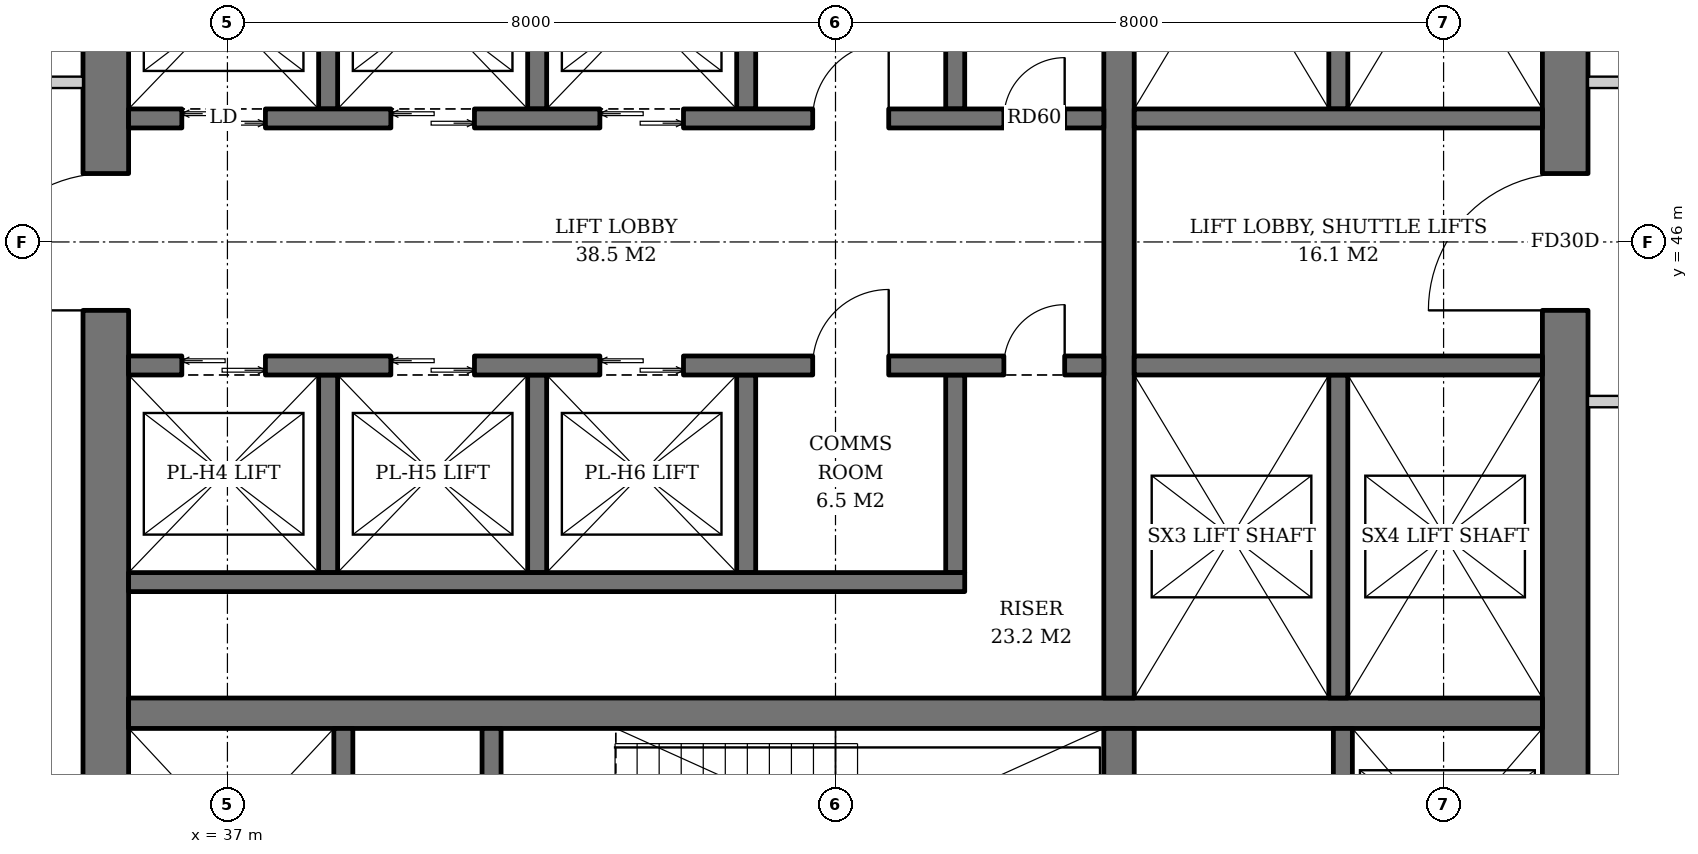
"""IFC4 building model, lengths in metres.
Left out: names, types, materials, properties, quantities, classifications, styles, units other than length and angle.
Written with IfcOpenShell. Run it as: python <this file> out.ifc"""

import sys

from ifc_helpers import new_model, si_unit, direction, frame, frame_2d, origin, place, context, subcontext, project, spatial, rectangle, extrude, element, fill, save


model = new_model("IFC4")
c1 = context("Model", 3, precision=1e-05, world=origin(), true_north=direction((0.0, 1.0)))
c2 = subcontext(c1, "Body", "Model", "MODEL_VIEW")
j1 = project(units=[si_unit("LENGTHUNIT", "METRE"), si_unit("PLANEANGLEUNIT", "RADIAN")], contexts=[c1])
p1 = place(None, origin())
s1 = spatial("IfcSite", under=j1, at=p1, CompositionType="ELEMENT")
p2 = place(p1, origin())
s2 = spatial("IfcBuilding", under=s1, at=p2, CompositionType="ELEMENT")
p3 = place(p2, frame((0.0, 0.0, 195.8)))
s3 = spatial("IfcBuildingStorey", under=s2, at=p3, CompositionType="ELEMENT", Elevation=195.8)
p4 = place(p3, frame((35.4, 36.7, 0.0), z_axis=(0.0, 0.0, 1.0), x_axis=(0.0, 1.0, 0.0)))
e1 = element("IfcWall", 1, at=p4, inside=s3, PredefinedType="SHEAR", context=c2, shape_type="SweptSolid", body=[
    extrude(rectangle(XDim=18.6, YDim=0.6, at=frame_2d((9.3, 0.0))), origin(), (0.0, 0.0, 1.0), 3.8),
])
p5 = place(p4, frame((8.4, 0.0, 0.0)))
e2 = element("IfcOpeningElement", 2, at=p5, cuts=e1, PredefinedType="OPENING", context=c2, shape_type="SweptSolid", body=[
    extrude(rectangle(XDim=1.8, YDim=2.4, at=frame_2d((0.9, 1.2))), frame((0.0, 0.31, 0.0), z_axis=(0.0, -1.0, 0.0), x_axis=(1.0, 0.0, 0.0)), (0.0, 0.0, 1.0), 0.62),
])
p6 = place(p3, frame((54.6, 36.7, 0.0), z_axis=(0.0, 0.0, 1.0), x_axis=(0.0, 1.0, 0.0)))
e3 = element("IfcWall", 3, at=p6, inside=s3, PredefinedType="SHEAR", context=c2, shape_type="SweptSolid", body=[
    extrude(rectangle(XDim=18.6, YDim=0.6, at=frame_2d((9.3, 0.0))), origin(), (0.0, 0.0, 1.0), 3.8),
])
p7 = place(p6, frame((8.4, 0.0, 0.0)))
e4 = element("IfcOpeningElement", 4, at=p7, cuts=e3, PredefinedType="OPENING", context=c2, shape_type="SweptSolid", body=[
    extrude(rectangle(XDim=1.8, YDim=2.4, at=frame_2d((0.9, 1.2))), frame((0.0, 0.31, 0.0), z_axis=(0.0, -1.0, 0.0), x_axis=(1.0, 0.0, 0.0)), (0.0, 0.0, 1.0), 0.62),
])
p8 = place(p3, frame((35.7, 39.8, 0.0), z_axis=(0.0, 0.0, 1.0), x_axis=(1.0, 0.0, 0.0)))
e5 = element("IfcWall", 5, at=p8, inside=s3, PredefinedType="SHEAR", context=c2, shape_type="SweptSolid", body=[
    extrude(rectangle(XDim=18.6, YDim=0.4, at=frame_2d((9.3, 0.0))), origin(), (0.0, 0.0, 1.0), 3.8),
])
p9 = place(p3, frame((48.73, 36.7, 0.0), z_axis=(0.0, 0.0, 1.0), x_axis=(0.0, 1.0, 0.0)))
e6 = element("IfcWall", 6, at=p9, inside=s3, PredefinedType="SHEAR", context=c2, shape_type="SweptSolid", body=[
    extrude(rectangle(XDim=2.9, YDim=0.4, at=frame_2d((1.45, 0.0))), origin(), (0.0, 0.0, 1.0), 3.8),
])
p10 = place(p3, frame((48.73, 40.0, 0.0), z_axis=(0.0, 0.0, 1.0), x_axis=(0.0, 1.0, 0.0)))
e7 = element("IfcWall", 7, at=p10, inside=s3, PredefinedType="SHEAR", context=c2, shape_type="SweptSolid", body=[
    extrude(rectangle(XDim=12.0, YDim=0.4, at=frame_2d((6.0, 0.0))), origin(), (0.0, 0.0, 1.0), 3.8),
])
p11 = place(p3, frame((38.525, 36.7, 0.0), z_axis=(0.0, 0.0, 1.0), x_axis=(0.0, 1.0, 0.0)))
e8 = element("IfcWall", 8, at=p11, inside=s3, PredefinedType="SHEAR", context=c2, shape_type="SweptSolid", body=[
    extrude(rectangle(XDim=2.9, YDim=0.25, at=frame_2d((1.45, 0.0))), origin(), (0.0, 0.0, 1.0), 3.8),
])
p12 = place(p11, frame((0.8, 0.0, 0.0)))
e9 = element("IfcOpeningElement", 9, at=p12, cuts=e8, PredefinedType="OPENING", context=c2, shape_type="SweptSolid", body=[
    extrude(rectangle(XDim=1.3, YDim=2.2, at=frame_2d((0.65, 1.1))), frame((0.0, 0.135, 0.0), z_axis=(0.0, -1.0, 0.0), x_axis=(1.0, 0.0, 0.0)), (0.0, 0.0, 1.0), 0.27),
])
p13 = place(p3, frame((40.475, 36.7, 0.0), z_axis=(0.0, 0.0, 1.0), x_axis=(0.0, 1.0, 0.0)))
e10 = element("IfcWall", 10, at=p13, inside=s3, PredefinedType="SHEAR", context=c2, shape_type="SweptSolid", body=[
    extrude(rectangle(XDim=2.9, YDim=0.25, at=frame_2d((1.45, 0.0))), origin(), (0.0, 0.0, 1.0), 3.8),
])
p14 = place(p13, frame((0.75, 0.0, 0.0)))
e11 = element("IfcOpeningElement", 11, at=p14, cuts=e10, PredefinedType="OPENING", context=c2, shape_type="SweptSolid", body=[
    extrude(rectangle(XDim=1.2, YDim=2.1, at=frame_2d((0.6, 1.05))), frame((0.0, 0.135, 0.0), z_axis=(0.0, -1.0, 0.0), x_axis=(1.0, 0.0, 0.0)), (0.0, 0.0, 1.0), 0.27),
])
p15 = place(p3, frame((51.675, 36.7, 0.0), z_axis=(0.0, 0.0, 1.0), x_axis=(0.0, 1.0, 0.0)))
e12 = element("IfcWall", 12, at=p15, inside=s3, PredefinedType="SHEAR", context=c2, shape_type="SweptSolid", body=[
    extrude(rectangle(XDim=2.9, YDim=0.25, at=frame_2d((1.45, 0.0))), origin(), (0.0, 0.0, 1.0), 3.8),
])
p16 = place(p15, frame((0.75, 0.0, 0.0)))
e13 = element("IfcOpeningElement", 13, at=p16, cuts=e12, PredefinedType="OPENING", context=c2, shape_type="SweptSolid", body=[
    extrude(rectangle(XDim=1.4, YDim=2.4, at=frame_2d((0.7, 1.2))), frame((0.0, 0.135, 0.0), z_axis=(0.0, -1.0, 0.0), x_axis=(1.0, 0.0, 0.0)), (0.0, 0.0, 1.0), 0.27),
])
for number, where, z_axis, x_axis in (
    (14, (38.325, 47.75, 0.0), (0.0, 0.0, 1.0), (0.0, 1.0, 0.0)),
    (15, (41.075, 47.75, 0.0), (0.0, 0.0, 1.0), (0.0, 1.0, 0.0)),
    (16, (43.825, 47.75, 0.0), (0.0, 0.0, 1.0), (0.0, 1.0, 0.0)),
    (17, (46.575, 47.75, 0.0), (0.0, 0.0, 1.0), (0.0, 1.0, 0.0)),
):
    element("IfcWall", number, at=place(p3, frame(where, z_axis=z_axis, x_axis=x_axis)), inside=s3, PredefinedType="SHEAR", context=c2, shape_type="SweptSolid", body=[
        extrude(rectangle(XDim=2.6, YDim=0.25, at=frame_2d((1.3, 0.0))), origin(), (0.0, 0.0, 1.0), 3.8),
    ])
p17 = place(p3, frame((35.7, 47.625, 0.0), z_axis=(0.0, 0.0, 1.0), x_axis=(1.0, 0.0, 0.0)))
e18 = element("IfcWall", 18, at=p17, inside=s3, PredefinedType="SHEAR", context=c2, shape_type="SweptSolid", body=[
    extrude(rectangle(XDim=12.83, YDim=0.25, at=frame_2d((6.415, 0.0))), origin(), (0.0, 0.0, 1.0), 3.8),
])
p18 = place(p17, frame((0.7, 0.0, 0.0)))
e19 = element("IfcOpeningElement", 19, at=p18, cuts=e18, PredefinedType="OPENING", context=c2, shape_type="SweptSolid", body=[
    extrude(rectangle(XDim=1.1, YDim=2.2, at=frame_2d((0.55, 1.1))), frame((0.0, 0.135, 0.0), z_axis=(0.0, -1.0, 0.0), x_axis=(1.0, 0.0, 0.0)), (0.0, 0.0, 1.0), 0.27),
])
p19 = place(p17, frame((3.45, 0.0, 0.0)))
e20 = element("IfcOpeningElement", 20, at=p19, cuts=e18, PredefinedType="OPENING", context=c2, shape_type="SweptSolid", body=[
    extrude(rectangle(XDim=1.1, YDim=2.2, at=frame_2d((0.55, 1.1))), frame((0.0, 0.135, 0.0), z_axis=(0.0, -1.0, 0.0), x_axis=(1.0, 0.0, 0.0)), (0.0, 0.0, 1.0), 0.27),
])
p20 = place(p17, frame((6.2, 0.0, 0.0)))
e21 = element("IfcOpeningElement", 21, at=p20, cuts=e18, PredefinedType="OPENING", context=c2, shape_type="SweptSolid", body=[
    extrude(rectangle(XDim=1.1, YDim=2.2, at=frame_2d((0.55, 1.1))), frame((0.0, 0.135, 0.0), z_axis=(0.0, -1.0, 0.0), x_axis=(1.0, 0.0, 0.0)), (0.0, 0.0, 1.0), 0.27),
])
p21 = place(p17, frame((9.0, 0.0, 0.0)))
e22 = element("IfcOpeningElement", 22, at=p21, cuts=e18, PredefinedType="OPENING", context=c2, shape_type="SweptSolid", body=[
    extrude(rectangle(XDim=1.0, YDim=2.1, at=frame_2d((0.5, 1.05))), frame((0.0, 0.135, 0.0), z_axis=(0.0, -1.0, 0.0), x_axis=(1.0, 0.0, 0.0)), (0.0, 0.0, 1.0), 0.27),
])
p22 = place(p17, frame((11.515, 0.0, 0.0)))
e23 = element("IfcOpeningElement", 23, at=p22, cuts=e18, PredefinedType="OPENING", context=c2, shape_type="SweptSolid", body=[
    extrude(rectangle(XDim=0.8, YDim=2.0, at=frame_2d((0.4, 1.0))), frame((0.0, 0.135, 0.0), z_axis=(0.0, -1.0, 0.0), x_axis=(1.0, 0.0, 0.0)), (0.0, 0.0, 1.0), 0.27),
])
for number, where, z_axis, x_axis in (
    (24, (38.325, 44.25, 0.0), (0.0, 0.0, 1.0), (0.0, -1.0, 0.0)),
    (25, (41.075, 44.25, 0.0), (0.0, 0.0, 1.0), (0.0, -1.0, 0.0)),
    (26, (43.825, 44.25, 0.0), (0.0, 0.0, 1.0), (0.0, -1.0, 0.0)),
    (27, (46.575, 44.25, 0.0), (0.0, 0.0, 1.0), (0.0, -1.0, 0.0)),
):
    element("IfcWall", number, at=place(p3, frame(where, z_axis=z_axis, x_axis=x_axis)), inside=s3, PredefinedType="SHEAR", context=c2, shape_type="SweptSolid", body=[
        extrude(rectangle(XDim=2.6, YDim=0.25, at=frame_2d((1.3, 0.0))), origin(), (0.0, 0.0, 1.0), 3.8),
    ])
p23 = place(p3, frame((35.7, 41.525, 0.0), z_axis=(0.0, 0.0, 1.0), x_axis=(1.0, 0.0, 0.0)))
e28 = element("IfcWall", 28, at=p23, inside=s3, PredefinedType="SHEAR", context=c2, shape_type="SweptSolid", body=[
    extrude(rectangle(XDim=11.0, YDim=0.25, at=frame_2d((5.5, 0.0))), origin(), (0.0, 0.0, 1.0), 3.8),
])
p24 = place(p3, frame((35.7, 44.375, 0.0), z_axis=(0.0, 0.0, 1.0), x_axis=(1.0, 0.0, 0.0)))
e29 = element("IfcWall", 29, at=p24, inside=s3, PredefinedType="SHEAR", context=c2, shape_type="SweptSolid", body=[
    extrude(rectangle(XDim=12.83, YDim=0.25, at=frame_2d((6.415, 0.0))), origin(), (0.0, 0.0, 1.0), 3.8),
])
p25 = place(p24, frame((0.7, 0.0, 0.0)))
e30 = element("IfcOpeningElement", 30, at=p25, cuts=e29, PredefinedType="OPENING", context=c2, shape_type="SweptSolid", body=[
    extrude(rectangle(XDim=1.1, YDim=2.2, at=frame_2d((0.55, 1.1))), frame((0.0, 0.135, 0.0), z_axis=(0.0, -1.0, 0.0), x_axis=(1.0, 0.0, 0.0)), (0.0, 0.0, 1.0), 0.27),
])
p26 = place(p24, frame((3.45, 0.0, 0.0)))
e31 = element("IfcOpeningElement", 31, at=p26, cuts=e29, PredefinedType="OPENING", context=c2, shape_type="SweptSolid", body=[
    extrude(rectangle(XDim=1.1, YDim=2.2, at=frame_2d((0.55, 1.1))), frame((0.0, 0.135, 0.0), z_axis=(0.0, -1.0, 0.0), x_axis=(1.0, 0.0, 0.0)), (0.0, 0.0, 1.0), 0.27),
])
p27 = place(p24, frame((6.2, 0.0, 0.0)))
e32 = element("IfcOpeningElement", 32, at=p27, cuts=e29, PredefinedType="OPENING", context=c2, shape_type="SweptSolid", body=[
    extrude(rectangle(XDim=1.1, YDim=2.2, at=frame_2d((0.55, 1.1))), frame((0.0, 0.135, 0.0), z_axis=(0.0, -1.0, 0.0), x_axis=(1.0, 0.0, 0.0)), (0.0, 0.0, 1.0), 0.27),
])
p28 = place(p24, frame((9.0, 0.0, 0.0)))
e33 = element("IfcOpeningElement", 33, at=p28, cuts=e29, PredefinedType="OPENING", context=c2, shape_type="SweptSolid", body=[
    extrude(rectangle(XDim=1.0, YDim=2.1, at=frame_2d((0.5, 1.05))), frame((0.0, 0.135, 0.0), z_axis=(0.0, -1.0, 0.0), x_axis=(1.0, 0.0, 0.0)), (0.0, 0.0, 1.0), 0.27),
])
p29 = place(p24, frame((11.515, 0.0, 0.0)))
e34 = element("IfcOpeningElement", 34, at=p29, cuts=e29, PredefinedType="OPENING", context=c2, shape_type="SweptSolid", body=[
    extrude(rectangle(XDim=0.8, YDim=2.0, at=frame_2d((0.4, 1.0))), frame((0.0, 0.135, 0.0), z_axis=(0.0, -1.0, 0.0), x_axis=(1.0, 0.0, 0.0)), (0.0, 0.0, 1.0), 0.27),
])
p30 = place(p3, frame((51.615, 47.75, 0.0), z_axis=(0.0, 0.0, 1.0), x_axis=(0.0, 1.0, 0.0)))
e35 = element("IfcWall", 35, at=p30, inside=s3, PredefinedType="SHEAR", context=c2, shape_type="SweptSolid", body=[
    extrude(rectangle(XDim=4.25, YDim=0.25, at=frame_2d((2.125, 0.0))), origin(), (0.0, 0.0, 1.0), 3.8),
])
p31 = place(p3, frame((48.93, 47.625, 0.0), z_axis=(0.0, 0.0, 1.0), x_axis=(1.0, 0.0, 0.0)))
e36 = element("IfcWall", 36, at=p31, inside=s3, PredefinedType="SHEAR", context=c2, shape_type="SweptSolid", body=[
    extrude(rectangle(XDim=5.37, YDim=0.25, at=frame_2d((2.685, 0.0))), origin(), (0.0, 0.0, 1.0), 3.8),
])
p32 = place(p3, frame((51.615, 44.25, 0.0), z_axis=(0.0, 0.0, 1.0), x_axis=(0.0, -1.0, 0.0)))
e37 = element("IfcWall", 37, at=p32, inside=s3, PredefinedType="SHEAR", context=c2, shape_type="SweptSolid", body=[
    extrude(rectangle(XDim=4.25, YDim=0.25, at=frame_2d((2.125, 0.0))), origin(), (0.0, 0.0, 1.0), 3.8),
])
p33 = place(p3, frame((48.93, 44.375, 0.0), z_axis=(0.0, 0.0, 1.0), x_axis=(1.0, 0.0, 0.0)))
e38 = element("IfcWall", 38, at=p33, inside=s3, PredefinedType="SHEAR", context=c2, shape_type="SweptSolid", body=[
    extrude(rectangle(XDim=5.37, YDim=0.25, at=frame_2d((2.685, 0.0))), origin(), (0.0, 0.0, 1.0), 3.8),
])
for number, where, z_axis, x_axis in (
    (39, (54.9, 43.9, 0.0), (0.0, 0.0, 1.0), (1.0, 0.0, 0.0)),
    (40, (54.9, 48.1, 0.0), (0.0, 0.0, 1.0), (1.0, 0.0, 0.0)),
    (41, (35.1, 48.1, 0.0), (0.0, 0.0, 1.0), (-1.0, 0.0, 0.0)),
):
    element("IfcWall", number, at=place(p3, frame(where, z_axis=z_axis, x_axis=x_axis)), inside=s3, PredefinedType="PARTITIONING", context=c2, shape_type="SweptSolid", body=[
        extrude(rectangle(XDim=2.325, YDim=0.15, at=frame_2d((1.163, 0.0))), origin(), (0.0, 0.0, 1.0), 3.62),
    ])
p34 = place(p18, origin())
e42 = element("IfcDoor", 42, at=p34, inside=s3, OperationType="DOUBLE_DOOR_SLIDING", PredefinedType="DOOR", context=c2, shape_type="SweptSolid", body=[
    extrude(rectangle(XDim=1.1, YDim=2.2, at=frame_2d((0.55, 1.1))), frame((0.0, 0.025, 0.0), z_axis=(0.0, -1.0, 0.0), x_axis=(1.0, 0.0, 0.0)), (0.0, 0.0, 1.0), 0.05),
])
fill(e19, e42)
p35 = place(p19, origin())
e43 = element("IfcDoor", 43, at=p35, inside=s3, OperationType="DOUBLE_DOOR_SLIDING", PredefinedType="DOOR", context=c2, shape_type="SweptSolid", body=[
    extrude(rectangle(XDim=1.1, YDim=2.2, at=frame_2d((0.55, 1.1))), frame((0.0, 0.025, 0.0), z_axis=(0.0, -1.0, 0.0), x_axis=(1.0, 0.0, 0.0)), (0.0, 0.0, 1.0), 0.05),
])
fill(e20, e43)
p36 = place(p20, origin())
e44 = element("IfcDoor", 44, at=p36, inside=s3, OperationType="DOUBLE_DOOR_SLIDING", PredefinedType="DOOR", context=c2, shape_type="SweptSolid", body=[
    extrude(rectangle(XDim=1.1, YDim=2.2, at=frame_2d((0.55, 1.1))), frame((0.0, 0.025, 0.0), z_axis=(0.0, -1.0, 0.0), x_axis=(1.0, 0.0, 0.0)), (0.0, 0.0, 1.0), 0.05),
])
fill(e21, e44)
p37 = place(p21, origin())
e45 = element("IfcDoor", 45, at=p37, inside=s3, OperationType="SINGLE_SWING_RIGHT", PredefinedType="DOOR", context=c2, shape_type="SweptSolid", body=[
    extrude(rectangle(XDim=1.0, YDim=2.1, at=frame_2d((0.5, 1.05))), frame((0.0, 0.025, 0.0), z_axis=(0.0, -1.0, 0.0), x_axis=(1.0, 0.0, 0.0)), (0.0, 0.0, 1.0), 0.05),
])
fill(e22, e45)
p38 = place(p22, origin())
e46 = element("IfcDoor", 46, at=p38, inside=s3, OperationType="SINGLE_SWING_RIGHT", PredefinedType="DOOR", context=c2, shape_type="SweptSolid", body=[
    extrude(rectangle(XDim=0.8, YDim=2.0, at=frame_2d((0.4, 1.0))), frame((0.0, 0.025, 0.0), z_axis=(0.0, -1.0, 0.0), x_axis=(1.0, 0.0, 0.0)), (0.0, 0.0, 1.0), 0.05),
])
fill(e23, e46)
p39 = place(p25, origin())
e47 = element("IfcDoor", 47, at=p39, inside=s3, OperationType="DOUBLE_DOOR_SLIDING", PredefinedType="DOOR", context=c2, shape_type="SweptSolid", body=[
    extrude(rectangle(XDim=1.1, YDim=2.2, at=frame_2d((0.55, 1.1))), frame((0.0, 0.025, 0.0), z_axis=(0.0, -1.0, 0.0), x_axis=(1.0, 0.0, 0.0)), (0.0, 0.0, 1.0), 0.05),
])
fill(e30, e47)
p40 = place(p26, origin())
e48 = element("IfcDoor", 48, at=p40, inside=s3, OperationType="DOUBLE_DOOR_SLIDING", PredefinedType="DOOR", context=c2, shape_type="SweptSolid", body=[
    extrude(rectangle(XDim=1.1, YDim=2.2, at=frame_2d((0.55, 1.1))), frame((0.0, 0.025, 0.0), z_axis=(0.0, -1.0, 0.0), x_axis=(1.0, 0.0, 0.0)), (0.0, 0.0, 1.0), 0.05),
])
fill(e31, e48)
p41 = place(p27, origin())
e49 = element("IfcDoor", 49, at=p41, inside=s3, OperationType="DOUBLE_DOOR_SLIDING", PredefinedType="DOOR", context=c2, shape_type="SweptSolid", body=[
    extrude(rectangle(XDim=1.1, YDim=2.2, at=frame_2d((0.55, 1.1))), frame((0.0, 0.025, 0.0), z_axis=(0.0, -1.0, 0.0), x_axis=(1.0, 0.0, 0.0)), (0.0, 0.0, 1.0), 0.05),
])
fill(e32, e49)
p42 = place(p28, origin())
e50 = element("IfcDoor", 50, at=p42, inside=s3, OperationType="SINGLE_SWING_RIGHT", PredefinedType="DOOR", context=c2, shape_type="SweptSolid", body=[
    extrude(rectangle(XDim=1.0, YDim=2.1, at=frame_2d((0.5, 1.05))), frame((0.0, 0.025, 0.0), z_axis=(0.0, -1.0, 0.0), x_axis=(1.0, 0.0, 0.0)), (0.0, 0.0, 1.0), 0.05),
])
fill(e33, e50)
p43 = place(p29, origin())
e51 = element("IfcDoor", 51, at=p43, inside=s3, OperationType="SINGLE_SWING_RIGHT", PredefinedType="DOOR", context=c2, shape_type="SweptSolid", body=[
    extrude(rectangle(XDim=0.8, YDim=2.0, at=frame_2d((0.4, 1.0))), frame((0.0, 0.025, 0.0), z_axis=(0.0, -1.0, 0.0), x_axis=(1.0, 0.0, 0.0)), (0.0, 0.0, 1.0), 0.05),
])
fill(e34, e51)
p44 = place(p5, origin())
e52 = element("IfcDoor", 52, at=p44, inside=s3, OperationType="DOUBLE_DOOR_SINGLE_SWING", PredefinedType="DOOR", context=c2, shape_type="SweptSolid", body=[
    extrude(rectangle(XDim=1.8, YDim=2.4, at=frame_2d((0.9, 1.2))), frame((0.0, 0.025, 0.0), z_axis=(0.0, -1.0, 0.0), x_axis=(1.0, 0.0, 0.0)), (0.0, 0.0, 1.0), 0.05),
])
fill(e2, e52)
p45 = place(p7, origin())
e53 = element("IfcDoor", 53, at=p45, inside=s3, OperationType="DOUBLE_DOOR_SINGLE_SWING", PredefinedType="DOOR", context=c2, shape_type="SweptSolid", body=[
    extrude(rectangle(XDim=1.8, YDim=2.4, at=frame_2d((0.9, 1.2))), frame((0.0, 0.025, 0.0), z_axis=(0.0, -1.0, 0.0), x_axis=(1.0, 0.0, 0.0)), (0.0, 0.0, 1.0), 0.05),
])
fill(e4, e53)
save(model, sys.argv[1])
